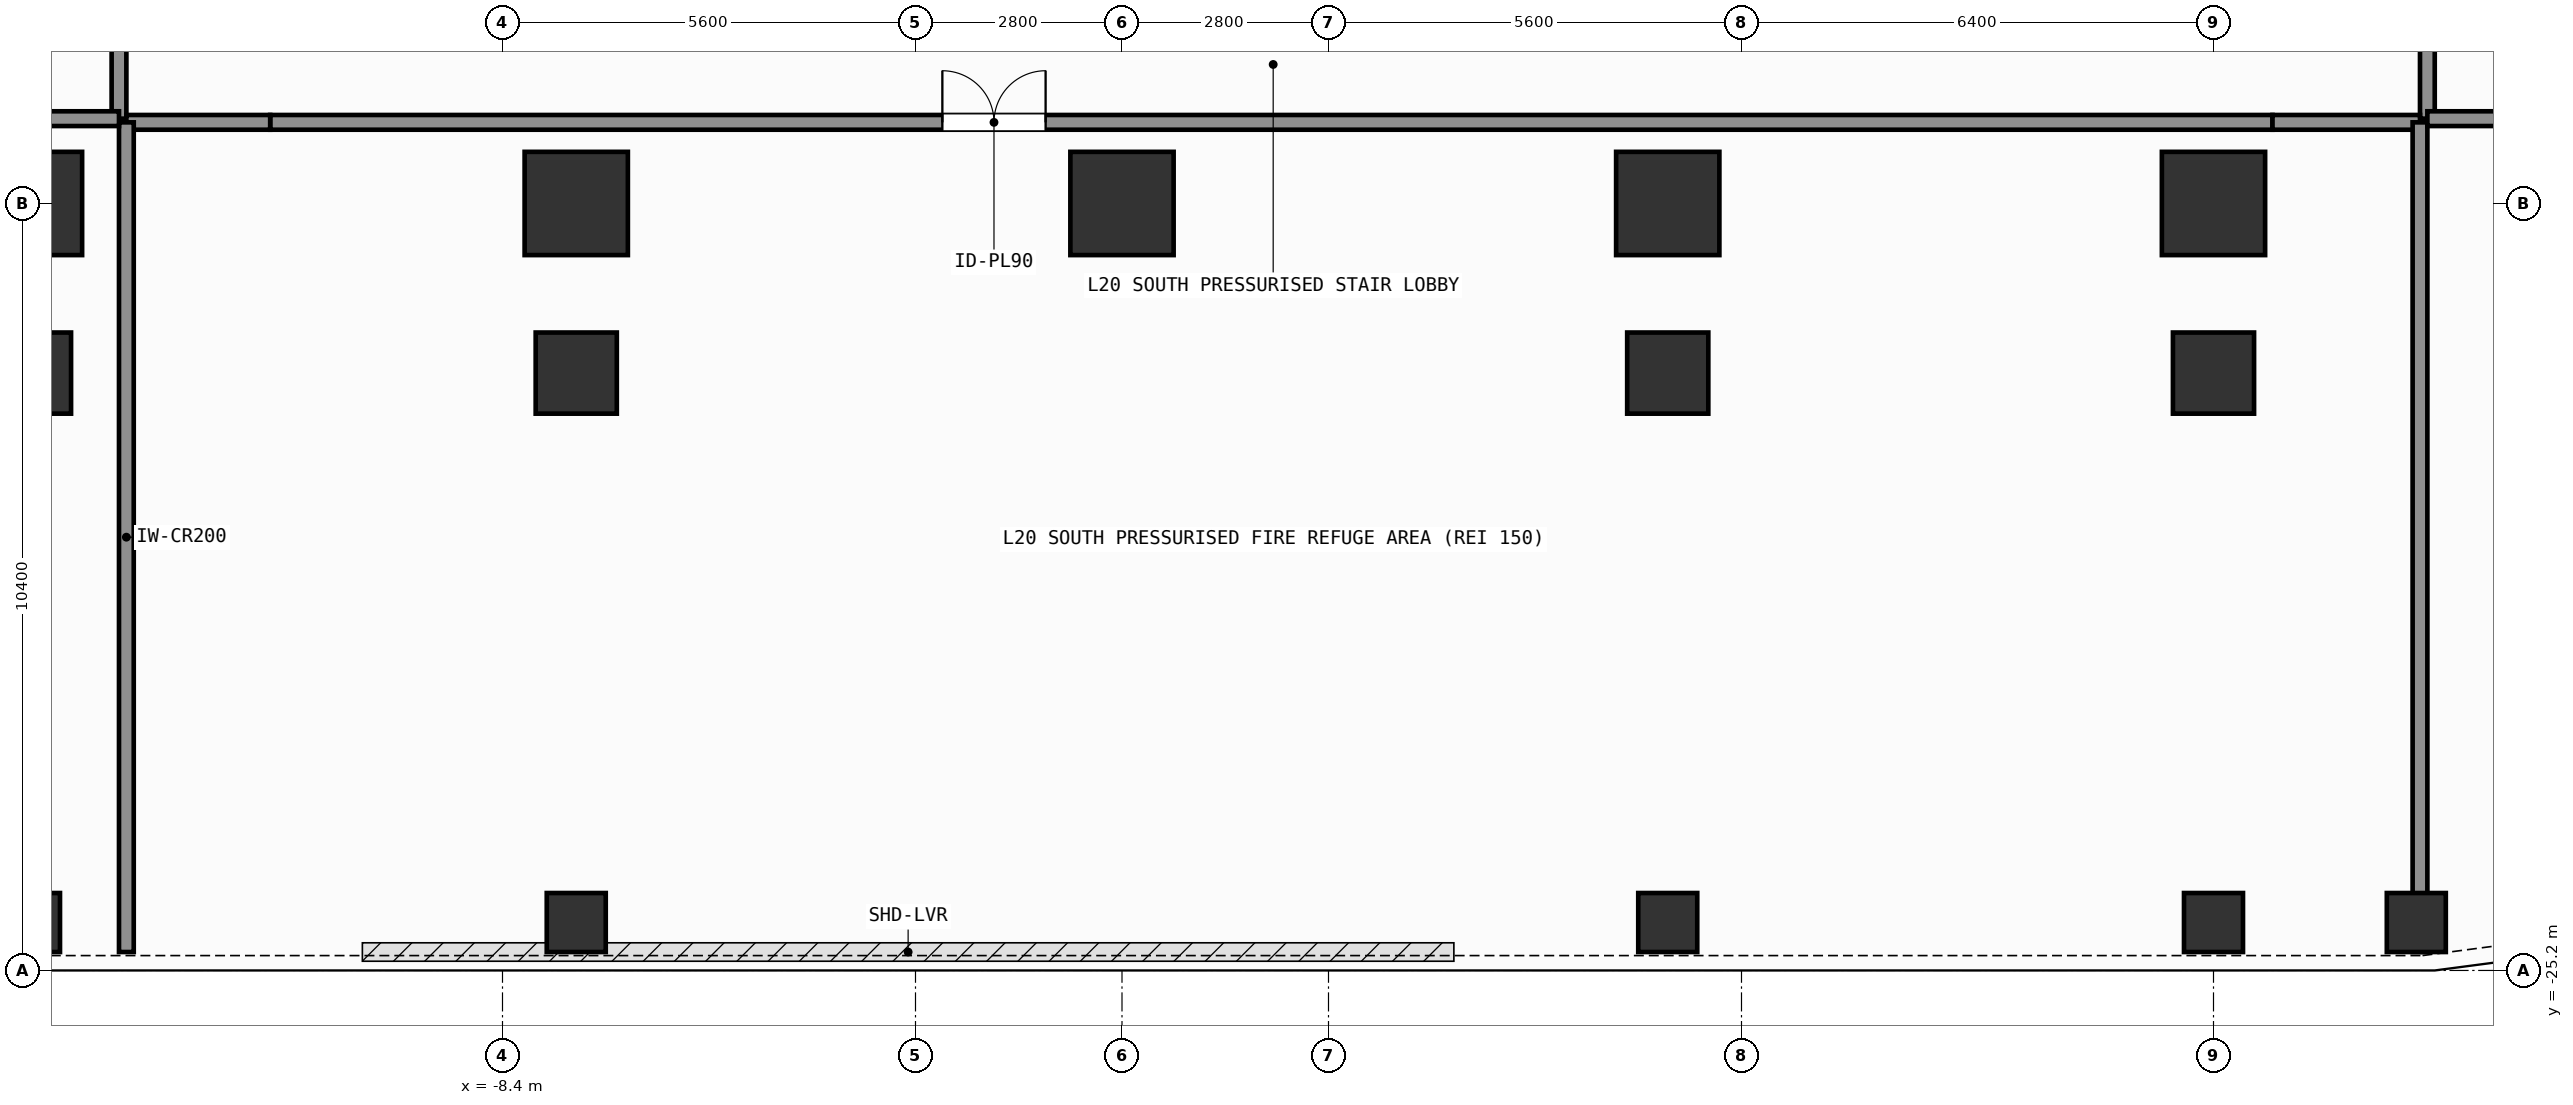
"""IFC4 building model, lengths in metres.
Left out: names, types, materials, properties, quantities, classifications, styles, units other than length and angle.
Written with IfcOpenShell. Run it as: python <this file> out.ifc"""

import sys

from ifc_helpers import new_model, si_unit, direction, frame, frame_2d, origin, origin_2d, place, context, subcontext, project, spatial, rectangle, hollow_rectangle, extrude, element, fill, save


model = new_model("IFC4")
c1 = context("Model", 3, precision=1e-05, world=origin(), true_north=direction((0.0, 1.0)))
c2 = subcontext(c1, "Body", "Model", "MODEL_VIEW")
j1 = project(units=[si_unit("LENGTHUNIT", "METRE"), si_unit("PLANEANGLEUNIT", "RADIAN")], contexts=[c1])
p1 = place(None, origin())
s1 = spatial("IfcSite", under=j1, at=p1, CompositionType="ELEMENT")
p2 = place(p1, origin())
s2 = spatial("IfcBuilding", under=s1, at=p2, CompositionType="ELEMENT")
p3 = place(p2, frame((0.0, 0.0, 77.4)))
s3 = spatial("IfcBuildingStorey", under=s2, at=p3, CompositionType="ELEMENT", Elevation=77.4)
for number, where, z_axis, x_axis in (
    (1, (-14.8, -14.8, 0.0), (0.0, 0.0, 1.0), (1.0, 0.0, 0.0)),
    (2, (-7.4, -14.8, 0.0), (0.0, 0.0, 1.0), (1.0, 0.0, 0.0)),
    (3, (0.0, -14.8, 0.0), (0.0, 0.0, 1.0), (1.0, 0.0, 0.0)),
    (4, (7.4, -14.8, 0.0), (0.0, 0.0, 1.0), (1.0, 0.0, 0.0)),
    (5, (14.8, -14.8, 0.0), (0.0, 0.0, 1.0), (1.0, 0.0, 0.0)),
):
    element("IfcColumn", number, at=place(p3, frame(where, z_axis=z_axis, x_axis=x_axis)), inside=s3, PredefinedType="COLUMN", context=c2, shape_type="SweptSolid", body=[
        extrude(rectangle(XDim=1.4, YDim=1.4, at=origin_2d()), origin(), (0.0, 0.0, 1.0), 7.8),
    ])
for number, where, z_axis, x_axis in (
    (6, (-14.8, -17.1, 0.0), (0.0, 0.0, 1.0), (1.0, 0.0, 0.0)),
    (7, (-7.4, -17.1, 0.0), (0.0, 0.0, 1.0), (1.0, 0.0, 0.0)),
    (8, (7.4, -17.1, 0.0), (0.0, 0.0, 1.0), (1.0, 0.0, 0.0)),
    (9, (14.8, -17.1, 0.0), (0.0, 0.0, 1.0), (1.0, 0.0, 0.0)),
):
    element("IfcColumn", number, at=place(p3, frame(where, z_axis=z_axis, x_axis=x_axis)), inside=s3, PredefinedType="COLUMN", context=c2, shape_type="SweptSolid", body=[
        extrude(rectangle(XDim=1.1, YDim=1.1, at=origin_2d()), origin(), (0.0, 0.0, 1.0), 7.8),
    ])
for number, where, z_axis, x_axis in (
    (10, (17.55, -24.55, 0.0), (0.0, 0.0, 1.0), (1.0, 0.0, 0.0)),
    (11, (-14.8, -24.55, 0.0), (0.0, 0.0, 1.0), (1.0, 0.0, 0.0)),
    (12, (-7.4, -24.55, 0.0), (0.0, 0.0, 1.0), (1.0, 0.0, 0.0)),
    (13, (7.4, -24.55, 0.0), (0.0, 0.0, 1.0), (1.0, 0.0, 0.0)),
    (14, (14.8, -24.55, 0.0), (0.0, 0.0, 1.0), (1.0, 0.0, 0.0)),
):
    element("IfcColumn", number, at=place(p3, frame(where, z_axis=z_axis, x_axis=x_axis)), inside=s3, PredefinedType="COLUMN", context=c2, shape_type="SweptSolid", body=[
        extrude(hollow_rectangle(XDim=0.8, YDim=0.8, WallThickness=0.036, at=origin_2d()), origin(), (0.0, 0.0, 1.0), 7.8),
    ])
p4 = place(p3, frame((-11.55, -13.7, 0.0), z_axis=(0.0, 0.0, 1.0), x_axis=(1.0, 0.0, 0.0)))
e15 = element("IfcWall", 15, at=p4, inside=s3, PredefinedType="SOLIDWALL", context=c2, shape_type="SweptSolid", body=[
    extrude(rectangle(XDim=27.15, YDim=0.2, at=frame_2d((13.575, 0.0))), origin(), (0.0, 0.0, 1.0), 7.52),
])
p5 = place(p4, frame((9.114, 0.0, 0.0)))
e16 = element("IfcOpeningElement", 16, at=p5, cuts=e15, PredefinedType="OPENING", context=c2, shape_type="SweptSolid", body=[
    extrude(rectangle(XDim=1.4, YDim=2.2, at=frame_2d((0.7, 1.1))), frame((0.0, 0.11, 0.0), z_axis=(0.0, -1.0, 0.0), x_axis=(1.0, 0.0, 0.0)), (0.0, 0.0, 1.0), 0.22),
])
p6 = place(p3, frame((-13.6, -13.65, 0.0), z_axis=(0.0, 0.0, 1.0), x_axis=(0.0, 1.0, 0.0)))
e17 = element("IfcWall", 17, at=p6, inside=s3, PredefinedType="SOLIDWALL", context=c2, shape_type="SweptSolid", body=[
    extrude(rectangle(XDim=13.73, YDim=0.2, at=frame_2d((6.865, 0.0))), origin(), (0.0, 0.0, 1.0), 7.52),
])
p7 = place(p6, frame((7.118, 0.0, 0.0)))
e18 = element("IfcOpeningElement", 18, at=p7, cuts=e17, PredefinedType="OPENING", context=c2, shape_type="SweptSolid", body=[
    extrude(rectangle(XDim=1.1, YDim=2.15, at=frame_2d((0.55, 1.075))), frame((0.0, 0.11, 0.0), z_axis=(0.0, -1.0, 0.0), x_axis=(1.0, 0.0, 0.0)), (0.0, 0.0, 1.0), 0.22),
])
p8 = place(p3, frame((17.7, -13.65, 0.0), z_axis=(0.0, 0.0, 1.0), x_axis=(0.0, 1.0, 0.0)))
e19 = element("IfcWall", 19, at=p8, inside=s3, PredefinedType="SOLIDWALL", context=c2, shape_type="SweptSolid", body=[
    extrude(rectangle(XDim=16.23, YDim=0.2, at=frame_2d((8.115, 0.0))), origin(), (0.0, 0.0, 1.0), 7.52),
])
p9 = place(p8, frame((7.654, 0.0, 0.0)))
e20 = element("IfcOpeningElement", 20, at=p9, cuts=e19, PredefinedType="OPENING", context=c2, shape_type="SweptSolid", body=[
    extrude(rectangle(XDim=1.1, YDim=2.15, at=frame_2d((0.55, 1.075))), frame((0.0, 0.11, 0.0), z_axis=(0.0, -1.0, 0.0), x_axis=(1.0, 0.0, 0.0)), (0.0, 0.0, 1.0), 0.22),
])
p10 = place(p3, frame((-13.5, -13.7, 0.0), z_axis=(0.0, 0.0, 1.0), x_axis=(1.0, 0.0, 0.0)))
e21 = element("IfcWall", 21, at=p10, inside=s3, PredefinedType="SOLIDWALL", context=c2, shape_type="SweptSolid", body=[
    extrude(rectangle(XDim=1.95, YDim=0.2, at=frame_2d((0.975, 0.0))), origin(), (0.0, 0.0, 1.0), 7.52),
])
p11 = place(p3, frame((15.6, -13.7, 0.0), z_axis=(0.0, 0.0, 1.0), x_axis=(1.0, 0.0, 0.0)))
e22 = element("IfcWall", 22, at=p11, inside=s3, PredefinedType="SOLIDWALL", context=c2, shape_type="SweptSolid", body=[
    extrude(rectangle(XDim=2.0, YDim=0.2, at=frame_2d((1.0, 0.0))), origin(), (0.0, 0.0, 1.0), 7.52),
])
for number, where, z_axis, x_axis in (
    (23, (-13.5, -24.95, 0.0), (0.0, 0.0, 1.0), (0.0, 1.0, 0.0)),
    (24, (17.6, -24.95, 0.0), (0.0, 0.0, 1.0), (0.0, 1.0, 0.0)),
):
    element("IfcWall", number, at=place(p3, frame(where, z_axis=z_axis, x_axis=x_axis)), inside=s3, PredefinedType="SOLIDWALL", context=c2, shape_type="SweptSolid", body=[
        extrude(rectangle(XDim=11.25, YDim=0.2, at=frame_2d((5.625, 0.0))), origin(), (0.0, 0.0, 1.0), 7.52),
    ])
p12 = place(p3, frame((-27.85, -13.65, 0.0), z_axis=(0.0, 0.0, 1.0), x_axis=(1.0, 0.0, 0.0)))
e25 = element("IfcWall", 25, at=p12, inside=s3, PredefinedType="SOLIDWALL", context=c2, shape_type="SweptSolid", body=[
    extrude(rectangle(XDim=14.25, YDim=0.2, at=frame_2d((7.125, 0.0))), origin(), (0.0, 0.0, 1.0), 7.52),
])
p13 = place(p3, frame((17.7, -13.65, 0.0), z_axis=(0.0, 0.0, 1.0), x_axis=(1.0, 0.0, 0.0)))
e26 = element("IfcWall", 26, at=p13, inside=s3, PredefinedType="SOLIDWALL", context=c2, shape_type="SweptSolid", body=[
    extrude(rectangle(XDim=4.35, YDim=0.2, at=frame_2d((2.175, 0.0))), origin(), (0.0, 0.0, 1.0), 7.52),
])
p14 = place(p5, origin())
e27 = element("IfcDoor", 27, at=p14, inside=s3, OperationType="SINGLE_SWING_LEFT", PredefinedType="DOOR", context=c2, shape_type="SweptSolid", body=[
    extrude(rectangle(XDim=1.4, YDim=2.2, at=frame_2d((0.7, 1.1))), frame((0.0, 0.025, 0.0), z_axis=(0.0, -1.0, 0.0), x_axis=(1.0, 0.0, 0.0)), (0.0, 0.0, 1.0), 0.05),
])
fill(e16, e27)
save(model, sys.argv[1])
